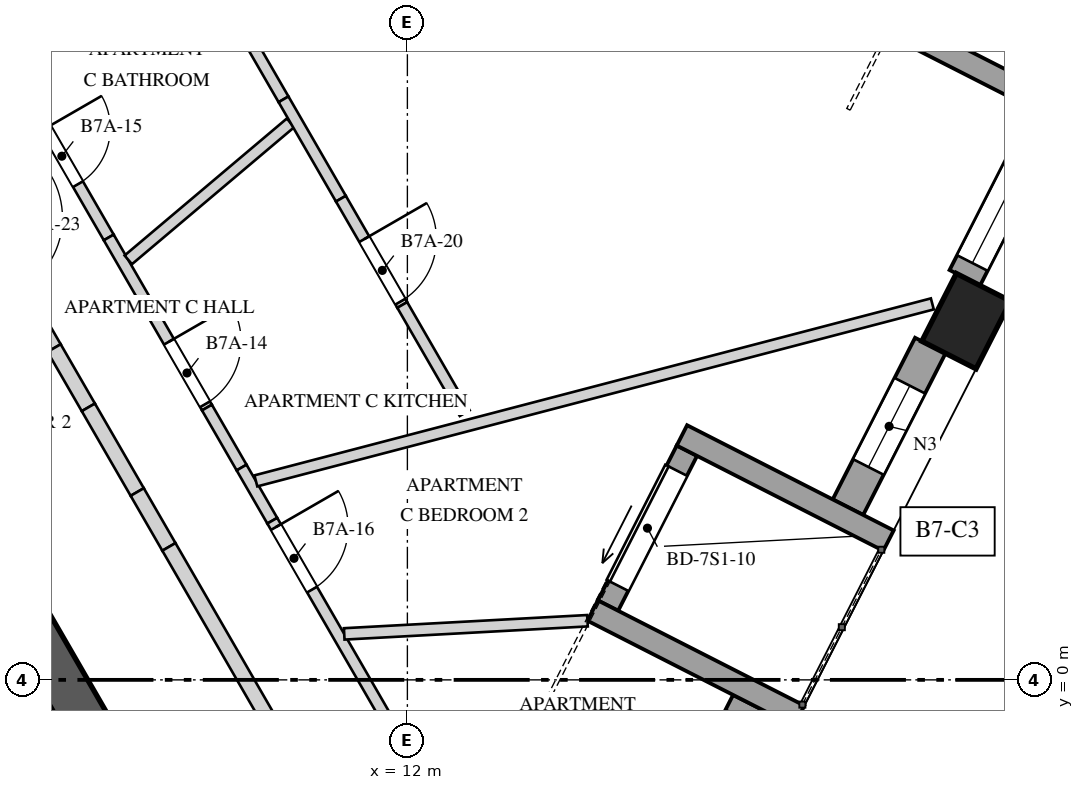
"""IFC4 building model, lengths in metres.
Left out: names, types, materials, properties, quantities, classifications, styles, units other than length and angle.
Written with IfcOpenShell. Run it as: python <this file> out.ifc"""

import sys

from ifc_helpers import new_model, si_unit, direction, frame, frame_2d, origin, origin_2d, place, context, subcontext, project, spatial, polyline, rectangle, outline, extrude, element, fill, save


model = new_model("IFC4")
c1 = context("Model", 3, precision=1e-05, world=origin(), true_north=direction((0.0, 1.0)))
c2 = subcontext(c1, "Body", "Model", "MODEL_VIEW")
j1 = project(units=[si_unit("LENGTHUNIT", "METRE"), si_unit("PLANEANGLEUNIT", "RADIAN")], contexts=[c1])
p1 = place(None, origin())
s1 = spatial("IfcSite", under=j1, at=p1, CompositionType="ELEMENT")
p2 = place(p1, origin())
s2 = spatial("IfcBuilding", under=s1, at=p2, CompositionType="ELEMENT")
p3 = place(p2, frame((0.0, 0.0, 274.4)))
s3 = spatial("IfcBuildingStorey", under=s2, at=p3, CompositionType="ELEMENT", Elevation=274.4)
p4 = place(p3, frame((9.902, -4.25, 0.0), z_axis=(0.0, 0.0, 1.0), x_axis=(-0.499999536116, 0.866025671608, 0.0)))
e1 = element("IfcWall", 1, at=p4, inside=s3, PredefinedType="SHEAR", context=c2, shape_type="SweptSolid", body=[
    extrude(rectangle(XDim=17.263, YDim=0.6, at=frame_2d((8.631, 0.0))), origin(), (0.0, 0.0, 1.0), 4.0),
])
p5 = place(p4, frame((6.906, 0.0, 0.0)))
e2 = element("IfcOpeningElement", 2, at=p5, cuts=e1, PredefinedType="OPENING", context=c2, shape_type="SweptSolid", body=[
    extrude(rectangle(XDim=1.0, YDim=2.4, at=frame_2d((0.5, 1.2))), frame((0.0, 0.31, 0.0), z_axis=(0.0, -1.0, 0.0), x_axis=(1.0, 0.0, 0.0)), (0.0, 0.0, 1.0), 0.62),
])
p6 = place(p3, frame((19.352, 4.719, -0.35), z_axis=(0.0, 0.0, 1.0), x_axis=(0.45399049974, 0.891006524188, 0.0)))
e3 = element("IfcColumn", 3, at=p6, inside=s3, PredefinedType="COLUMN", context=c2, shape_type="SweptSolid", body=[
    extrude(rectangle(XDim=1.0, YDim=0.8, at=origin_2d()), origin(), (0.0, 0.0, 1.0), 4.35),
])
p7 = place(p3, frame((15.402, -2.427, 0.0), z_axis=(0.0, 0.0, 1.0), x_axis=(0.453951830128, 0.891026226283, 0.0)))
e4 = element("IfcWall", 4, at=p7, inside=s3, PredefinedType="SOLIDWALL", context=c2, shape_type="SweptSolid", body=[
    extrude(rectangle(XDim=2.387, YDim=0.45, at=frame_2d((1.193, 0.0))), origin(), (0.0, 0.0, 1.0), 3.3),
])
p8 = place(p7, frame((0.218, 0.0, 0.4)))
e5 = element("IfcOpeningElement", 5, at=p8, cuts=e4, PredefinedType="OPENING", context=c2, shape_type="SweptSolid", body=[
    extrude(rectangle(XDim=1.95, YDim=2.75, at=frame_2d((0.975, 1.375))), frame((0.0, 0.235, 0.0), z_axis=(0.0, -1.0, 0.0), x_axis=(1.0, 0.0, 0.0)), (0.0, 0.0, 1.0), 0.47),
])
p9 = place(p3, frame((17.796, 2.272, 0.0), z_axis=(0.0, 0.0, 1.0), x_axis=(0.453951830128, 0.891026226283, 0.0)))
e6 = element("IfcWall", 6, at=p9, inside=s3, PredefinedType="SOLIDWALL", context=c2, shape_type="SweptSolid", body=[
    extrude(rectangle(XDim=2.387, YDim=0.45, at=frame_2d((1.193, 0.0))), origin(), (0.0, 0.0, 1.0), 3.3),
])
p10 = place(p9, frame((0.593, 0.0, 0.4)))
e7 = element("IfcOpeningElement", 7, at=p10, cuts=e6, PredefinedType="OPENING", context=c2, shape_type="SweptSolid", body=[
    extrude(rectangle(XDim=1.2, YDim=2.75, at=frame_2d((0.6, 1.375))), frame((0.0, 0.235, 0.0), z_axis=(0.0, -1.0, 0.0), x_axis=(1.0, 0.0, 0.0)), (0.0, 0.0, 1.0), 0.47),
])
p11 = place(p3, frame((19.334, 5.29, 0.0), z_axis=(0.0, 0.0, 1.0), x_axis=(0.453951830128, 0.891026226283, 0.0)))
e8 = element("IfcWall", 8, at=p11, inside=s3, PredefinedType="SOLIDWALL", context=c2, shape_type="SweptSolid", body=[
    extrude(rectangle(XDim=2.387, YDim=0.45, at=frame_2d((1.193, 0.0))), origin(), (0.0, 0.0, 1.0), 3.3),
])
p12 = place(p11, frame((0.218, 0.0, 0.4)))
e9 = element("IfcOpeningElement", 9, at=p12, cuts=e8, PredefinedType="OPENING", context=c2, shape_type="SweptSolid", body=[
    extrude(rectangle(XDim=1.95, YDim=2.75, at=frame_2d((0.975, 1.375))), frame((0.0, 0.235, 0.0), z_axis=(0.0, -1.0, 0.0), x_axis=(1.0, 0.0, 0.0)), (0.0, 0.0, 1.0), 0.47),
])
p13 = place(p3, frame((14.639, 0.977, 0.0), z_axis=(0.0, 0.0, 1.0), x_axis=(0.45403292632, 0.890984905494, 0.0)))
e10 = element("IfcWall", 10, at=p13, inside=s3, PredefinedType="SOLIDWALL", context=c2, shape_type="SweptSolid", body=[
    extrude(rectangle(XDim=2.287, YDim=0.3, at=frame_2d((1.144, 0.0))), origin(), (0.0, 0.0, 1.0), 3.3),
])
p14 = place(p13, frame((0.293, 0.0, 0.0)))
e11 = element("IfcOpeningElement", 11, at=p14, cuts=e10, PredefinedType="OPENING", context=c2, shape_type="SweptSolid", body=[
    extrude(rectangle(XDim=1.7, YDim=2.5, at=frame_2d((0.85, 1.25))), frame((0.0, 0.16, 0.0), z_axis=(0.0, -1.0, 0.0), x_axis=(1.0, 0.0, 0.0)), (0.0, 0.0, 1.0), 0.32),
])
for number, where, z_axis, x_axis in (
    (12, (17.155, -0.473, 0.0), (0.0, 0.0, 1.0), (-0.891, 0.454, 0.0)),
    (13, (18.329, 1.832, 0.0), (0.0, 0.0, 1.0), (-0.891, 0.454, 0.0)),
    (14, (21.087, 7.243, 0.0), (0.0, 0.0, 1.0), (-0.891, 0.454, 0.0)),
):
    element("IfcWall", number, at=place(p3, frame(where, z_axis=z_axis, x_axis=x_axis)), inside=s3, PredefinedType="SOLIDWALL", context=c2, shape_type="SweptSolid", body=[
        extrude(rectangle(XDim=3.05, YDim=0.3, at=frame_2d((1.525, 0.0))), origin(), (0.0, 0.0, 1.0), 3.3),
    ])
p15 = place(p3, frame((8.976, -4.147, 0.0), z_axis=(0.0, 0.0, 1.0), x_axis=(-0.49998037582, 0.866036733513, 0.0)))
e15 = element("IfcWall", 15, at=p15, inside=s3, PredefinedType="SOLIDWALL", context=c2, shape_type="SweptSolid", body=[
    extrude(rectangle(XDim=6.2, YDim=0.7, at=frame_2d((3.1, 0.0))), origin(), (0.0, 0.0, 1.0), 3.65),
])
p16 = place(p3, frame((7.216, 7.301, 0.0), z_axis=(0.0, 0.0, 1.0), x_axis=(0.500056273262, -0.865992911964, 0.0)))
e16 = element("IfcWall", 16, at=p16, inside=s3, PredefinedType="PARTITIONING", context=c2, shape_type="SweptSolid", body=[
    extrude(outline(polyline([(0.0, 0.0), (1.709, 0.0), (1.709, 2.55), (0.825, 2.55), (0.825, 3.65), (0.0, 3.65), (0.0, 0.0)])), frame((0.0, 0.075, 0.0), z_axis=(0.0, -1.0, 0.0), x_axis=(1.0, 0.0, 0.0)), (0.0, 0.0, 1.0), 0.15),
])
p17 = place(p16, frame((0.05, 0.0, 0.0)))
e17 = element("IfcOpeningElement", 17, at=p17, cuts=e16, PredefinedType="OPENING", context=c2, shape_type="SweptSolid", body=[
    extrude(rectangle(XDim=0.85, YDim=2.4, at=frame_2d((0.425, 1.2))), frame((0.0, 0.085, 0.0), z_axis=(0.0, -1.0, 0.0), x_axis=(1.0, 0.0, 0.0)), (0.0, 0.0, 1.0), 0.17),
])
p18 = place(p3, frame((8.071, 5.821, 0.0), z_axis=(0.0, 0.0, 1.0), x_axis=(0.500071713487, -0.865983996024, 0.0)))
e18 = element("IfcWall", 18, at=p18, inside=s3, PredefinedType="PARTITIONING", context=c2, shape_type="SweptSolid", body=[
    extrude(rectangle(XDim=0.968, YDim=0.15, at=frame_2d((0.484, 0.0))), origin(), (0.0, 0.0, 1.0), 3.65),
])
p19 = place(p3, frame((8.555, 4.982, 0.0), z_axis=(0.0, 0.0, 1.0), x_axis=(0.499957874332, -0.866049723684, 0.0)))
e19 = element("IfcWall", 19, at=p19, inside=s3, PredefinedType="PARTITIONING", context=c2, shape_type="SweptSolid", body=[
    extrude(outline(polyline([(0.0, 0.0), (1.616, 0.0), (1.616, 3.65), (0.876, 3.65), (0.876, 2.55), (0.0, 2.55), (0.0, 0.0)])), frame((0.0, 0.075, 0.0), z_axis=(0.0, -1.0, 0.0), x_axis=(1.0, 0.0, 0.0)), (0.0, 0.0, 1.0), 0.15),
])
p20 = place(p19, frame((0.616, 0.0, 0.0)))
e20 = element("IfcOpeningElement", 20, at=p20, cuts=e19, PredefinedType="OPENING", context=c2, shape_type="SweptSolid", body=[
    extrude(rectangle(XDim=0.95, YDim=2.4, at=frame_2d((0.475, 1.2))), frame((0.0, 0.085, 0.0), z_axis=(0.0, -1.0, 0.0), x_axis=(1.0, 0.0, 0.0)), (0.0, 0.0, 1.0), 0.17),
])
p21 = place(p3, frame((9.363, 3.583, 0.0), z_axis=(0.0, 0.0, 1.0), x_axis=(0.500085693753, -0.86597592282, 0.0)))
e21 = element("IfcWall", 21, at=p21, inside=s3, PredefinedType="PARTITIONING", context=c2, shape_type="SweptSolid", body=[
    extrude(rectangle(XDim=0.911, YDim=0.15, at=frame_2d((0.456, 0.0))), origin(), (0.0, 0.0, 1.0), 3.65),
])
p22 = place(p3, frame((9.819, 2.793, 0.0), z_axis=(0.0, 0.0, 1.0), x_axis=(0.499748625964, -0.866170486017, 0.0)))
e22 = element("IfcWall", 22, at=p22, inside=s3, PredefinedType="PARTITIONING", context=c2, shape_type="SweptSolid", body=[
    extrude(rectangle(XDim=0.808, YDim=0.15, at=frame_2d((0.404, 0.0))), origin(), (0.0, 0.0, 1.0), 2.75),
])
p23 = place(p3, frame((10.222, 2.094, 0.0), z_axis=(0.0, 0.0, 1.0), x_axis=(0.500039377857, -0.866002667774, 0.0)))
e23 = element("IfcWall", 23, at=p23, inside=s3, PredefinedType="PARTITIONING", context=c2, shape_type="SweptSolid", body=[
    extrude(rectangle(XDim=3.979, YDim=0.15, at=frame_2d((1.989, 0.0))), origin(), (0.0, 0.0, 1.0), 3.65),
])
p24 = place(p23, frame((0.097, 0.0, 0.0)))
e24 = element("IfcOpeningElement", 24, at=p24, cuts=e23, PredefinedType="OPENING", context=c2, shape_type="SweptSolid", body=[
    extrude(rectangle(XDim=0.95, YDim=2.4, at=frame_2d((0.475, 1.2))), frame((0.0, 0.085, 0.0), z_axis=(0.0, -1.0, 0.0), x_axis=(1.0, 0.0, 0.0)), (0.0, 0.0, 1.0), 0.17),
])
p25 = place(p3, frame((8.328, 5.526, 0.0), z_axis=(0.0, 0.0, 1.0), x_axis=(0.764108404466, 0.645087859306, 0.0)))
e25 = element("IfcWall", 25, at=p25, inside=s3, PredefinedType="PARTITIONING", context=c2, shape_type="SweptSolid", body=[
    extrude(rectangle(XDim=2.794, YDim=0.15, at=frame_2d((1.397, 0.0))), origin(), (0.0, 0.0, 1.0), 3.65),
])
p26 = place(p3, frame((9.928, 8.404, 0.0), z_axis=(0.0, 0.0, 1.0), x_axis=(0.500176418896, -0.865923524325, 0.0)))
e26 = element("IfcWall", 26, at=p26, inside=s3, PredefinedType="PARTITIONING", context=c2, shape_type="SweptSolid", body=[
    extrude(rectangle(XDim=0.885, YDim=0.15, at=frame_2d((0.442, 0.0))), origin(), (0.0, 0.0, 1.0), 2.55),
])
p27 = place(p3, frame((10.371, 7.638, 0.0), z_axis=(0.0, 0.0, 1.0), x_axis=(0.499983823482, -0.8660347431, 0.0)))
e27 = element("IfcWall", 27, at=p27, inside=s3, PredefinedType="PARTITIONING", context=c2, shape_type="SweptSolid", body=[
    extrude(rectangle(XDim=1.509, YDim=0.15, at=frame_2d((0.755, 0.0))), origin(), (0.0, 0.0, 1.0), 3.65),
])
p28 = place(p3, frame((11.125, 6.331, 0.0), z_axis=(0.0, 0.0, 1.0), x_axis=(0.500058405483, -0.865991680737, 0.0)))
e28 = element("IfcWall", 28, at=p28, inside=s3, PredefinedType="PARTITIONING", context=c2, shape_type="SweptSolid", body=[
    extrude(outline(polyline([(0.0, 0.0), (1.615, 0.0), (1.615, 3.65), (0.876, 3.65), (0.876, 2.55), (0.0, 2.55), (0.0, 0.0)])), frame((0.0, 0.075, 0.0), z_axis=(0.0, -1.0, 0.0), x_axis=(1.0, 0.0, 0.0)), (0.0, 0.0, 1.0), 0.15),
])
p29 = place(p28, frame((0.615, 0.0, 0.0)))
e29 = element("IfcOpeningElement", 29, at=p29, cuts=e28, PredefinedType="OPENING", context=c2, shape_type="SweptSolid", body=[
    extrude(rectangle(XDim=0.95, YDim=2.4, at=frame_2d((0.475, 1.2))), frame((0.0, 0.085, 0.0), z_axis=(0.0, -1.0, 0.0), x_axis=(1.0, 0.0, 0.0)), (0.0, 0.0, 1.0), 0.17),
])
p30 = place(p3, frame((11.933, 4.932, 0.0), z_axis=(0.0, 0.0, 1.0), x_axis=(0.499958243719, -0.866049510442, 0.0)))
e30 = element("IfcWall", 30, at=p30, inside=s3, PredefinedType="PARTITIONING", context=c2, shape_type="SweptSolid", body=[
    extrude(rectangle(XDim=1.643, YDim=0.15, at=frame_2d((0.822, 0.0))), origin(), (0.0, 0.0, 1.0), 3.65),
])
p31 = place(p3, frame((10.007, 2.618, 0.0), z_axis=(0.0, 0.0, 1.0), x_axis=(0.967438629988, 0.253105703624, 0.0)))
e31 = element("IfcWall", 31, at=p31, inside=s3, PredefinedType="PARTITIONING", context=c2, shape_type="SweptSolid", body=[
    extrude(rectangle(XDim=9.199, YDim=0.15, at=frame_2d((4.6, 0.0))), origin(), (0.0, 0.0, 1.0), 2.75),
])
p32 = place(p3, frame((14.369, 0.778, 0.0), z_axis=(0.0, 0.0, 1.0), x_axis=(-0.99853649782, -0.054081998127, 0.0)))
e32 = element("IfcWall", 32, at=p32, inside=s3, PredefinedType="PARTITIONING", context=c2, shape_type="SweptSolid", body=[
    extrude(rectangle(XDim=3.205, YDim=0.15, at=frame_2d((1.603, 0.0))), origin(), (0.0, 0.0, 1.0), 3.65),
])
p33 = place(p3, frame((7.007, 4.964, 0.0), z_axis=(0.0, 0.0, 1.0), x_axis=(0.499977339252, -0.866038486578, 0.0)))
e33 = element("IfcWall", 33, at=p33, inside=s3, PredefinedType="SOLIDWALL", context=c2, shape_type="SweptSolid", body=[
    extrude(rectangle(XDim=0.691, YDim=0.2, at=frame_2d((0.345, 0.0))), origin(), (0.0, 0.0, 1.0), 3.65),
])
p34 = place(p3, frame((7.352, 4.365, 0.0), z_axis=(0.0, 0.0, 1.0), x_axis=(0.500074377092, -0.865982457891, 0.0)))
e34 = element("IfcWall", 34, at=p34, inside=s3, PredefinedType="SOLIDWALL", context=c2, shape_type="SweptSolid", body=[
    extrude(rectangle(XDim=0.901, YDim=0.2, at=frame_2d((0.45, 0.0))), origin(), (0.0, 0.0, 1.0), 2.55),
])
p35 = place(p3, frame((7.803, 3.585, 0.0), z_axis=(0.0, 0.0, 1.0), x_axis=(0.500018234033, -0.866014876105, 0.0)))
e35 = element("IfcWall", 35, at=p35, inside=s3, PredefinedType="SOLIDWALL", context=c2, shape_type="SweptSolid", body=[
    extrude(rectangle(XDim=1.286, YDim=0.2, at=frame_2d((0.643, 0.0))), origin(), (0.0, 0.0, 1.0), 3.65),
])
p36 = place(p3, frame((8.446, 2.471, 0.0), z_axis=(0.0, 0.0, 1.0), x_axis=(0.499950631041, -0.86605390509, 0.0)))
e36 = element("IfcWall", 36, at=p36, inside=s3, PredefinedType="SOLIDWALL", context=c2, shape_type="SweptSolid", body=[
    extrude(rectangle(XDim=0.833, YDim=0.2, at=frame_2d((0.417, 0.0))), origin(), (0.0, 0.0, 1.0), 2.75),
])
p37 = place(p3, frame((8.863, 1.75, 0.0), z_axis=(0.0, 0.0, 1.0), x_axis=(0.500007556608, -0.866021040931, 0.0)))
e37 = element("IfcWall", 37, at=p37, inside=s3, PredefinedType="SOLIDWALL", context=c2, shape_type="SweptSolid", body=[
    extrude(rectangle(XDim=4.052, YDim=0.2, at=frame_2d((2.026, 0.0))), origin(), (0.0, 0.0, 1.0), 3.65),
])
p38 = place(p10, origin())
e38 = element("IfcWindow", 38, at=p38, inside=s3, PartitioningType="SINGLE_PANEL", PredefinedType="WINDOW", context=c2, shape_type="SweptSolid", body=[
    extrude(rectangle(XDim=1.2, YDim=2.75, at=frame_2d((0.6, 1.375))), frame((0.0, 0.03, 0.0), z_axis=(0.0, -1.0, 0.0), x_axis=(1.0, 0.0, 0.0)), (0.0, 0.0, 1.0), 0.06),
])
fill(e7, e38)
p39 = place(p12, origin())
e39 = element("IfcWindow", 39, at=p39, inside=s3, PartitioningType="SINGLE_PANEL", PredefinedType="WINDOW", context=c2, shape_type="SweptSolid", body=[
    extrude(rectangle(XDim=1.95, YDim=2.75, at=frame_2d((0.975, 1.375))), frame((0.0, 0.03, 0.0), z_axis=(0.0, -1.0, 0.0), x_axis=(1.0, 0.0, 0.0)), (0.0, 0.0, 1.0), 0.06),
])
fill(e9, e39)
p40 = place(p14, origin())
e40 = element("IfcDoor", 40, at=p40, inside=s3, OperationType="SLIDING_TO_LEFT", PredefinedType="DOOR", context=c2, shape_type="SweptSolid", body=[
    extrude(rectangle(XDim=1.7, YDim=2.5, at=frame_2d((0.85, 1.25))), frame((0.0, 0.025, 0.0), z_axis=(0.0, -1.0, 0.0), x_axis=(1.0, 0.0, 0.0)), (0.0, 0.0, 1.0), 0.05),
])
fill(e11, e40)
p41 = place(p20, origin())
e41 = element("IfcDoor", 41, at=p41, inside=s3, OperationType="SINGLE_SWING_RIGHT", PredefinedType="DOOR", context=c2, shape_type="SweptSolid", body=[
    extrude(rectangle(XDim=0.95, YDim=2.4, at=frame_2d((0.475, 1.2))), frame((0.0, 0.025, 0.0), z_axis=(0.0, -1.0, 0.0), x_axis=(1.0, 0.0, 0.0)), (0.0, 0.0, 1.0), 0.05),
])
fill(e20, e41)
p42 = place(p17, origin())
e42 = element("IfcDoor", 42, at=p42, inside=s3, OperationType="SINGLE_SWING_LEFT", PredefinedType="DOOR", context=c2, shape_type="SweptSolid", body=[
    extrude(rectangle(XDim=0.85, YDim=2.4, at=frame_2d((0.425, 1.2))), frame((0.0, 0.025, 0.0), z_axis=(0.0, -1.0, 0.0), x_axis=(1.0, 0.0, 0.0)), (0.0, 0.0, 1.0), 0.05),
])
fill(e17, e42)
p43 = place(p24, origin())
e43 = element("IfcDoor", 43, at=p43, inside=s3, OperationType="SINGLE_SWING_RIGHT", PredefinedType="DOOR", context=c2, shape_type="SweptSolid", body=[
    extrude(rectangle(XDim=0.95, YDim=2.4, at=frame_2d((0.475, 1.2))), frame((0.0, 0.025, 0.0), z_axis=(0.0, -1.0, 0.0), x_axis=(1.0, 0.0, 0.0)), (0.0, 0.0, 1.0), 0.05),
])
fill(e24, e43)
p44 = place(p29, origin())
e44 = element("IfcDoor", 44, at=p44, inside=s3, OperationType="SINGLE_SWING_RIGHT", PredefinedType="DOOR", context=c2, shape_type="SweptSolid", body=[
    extrude(rectangle(XDim=0.95, YDim=2.4, at=frame_2d((0.475, 1.2))), frame((0.0, 0.025, 0.0), z_axis=(0.0, -1.0, 0.0), x_axis=(1.0, 0.0, 0.0)), (0.0, 0.0, 1.0), 0.05),
])
fill(e29, e44)
save(model, sys.argv[1])
